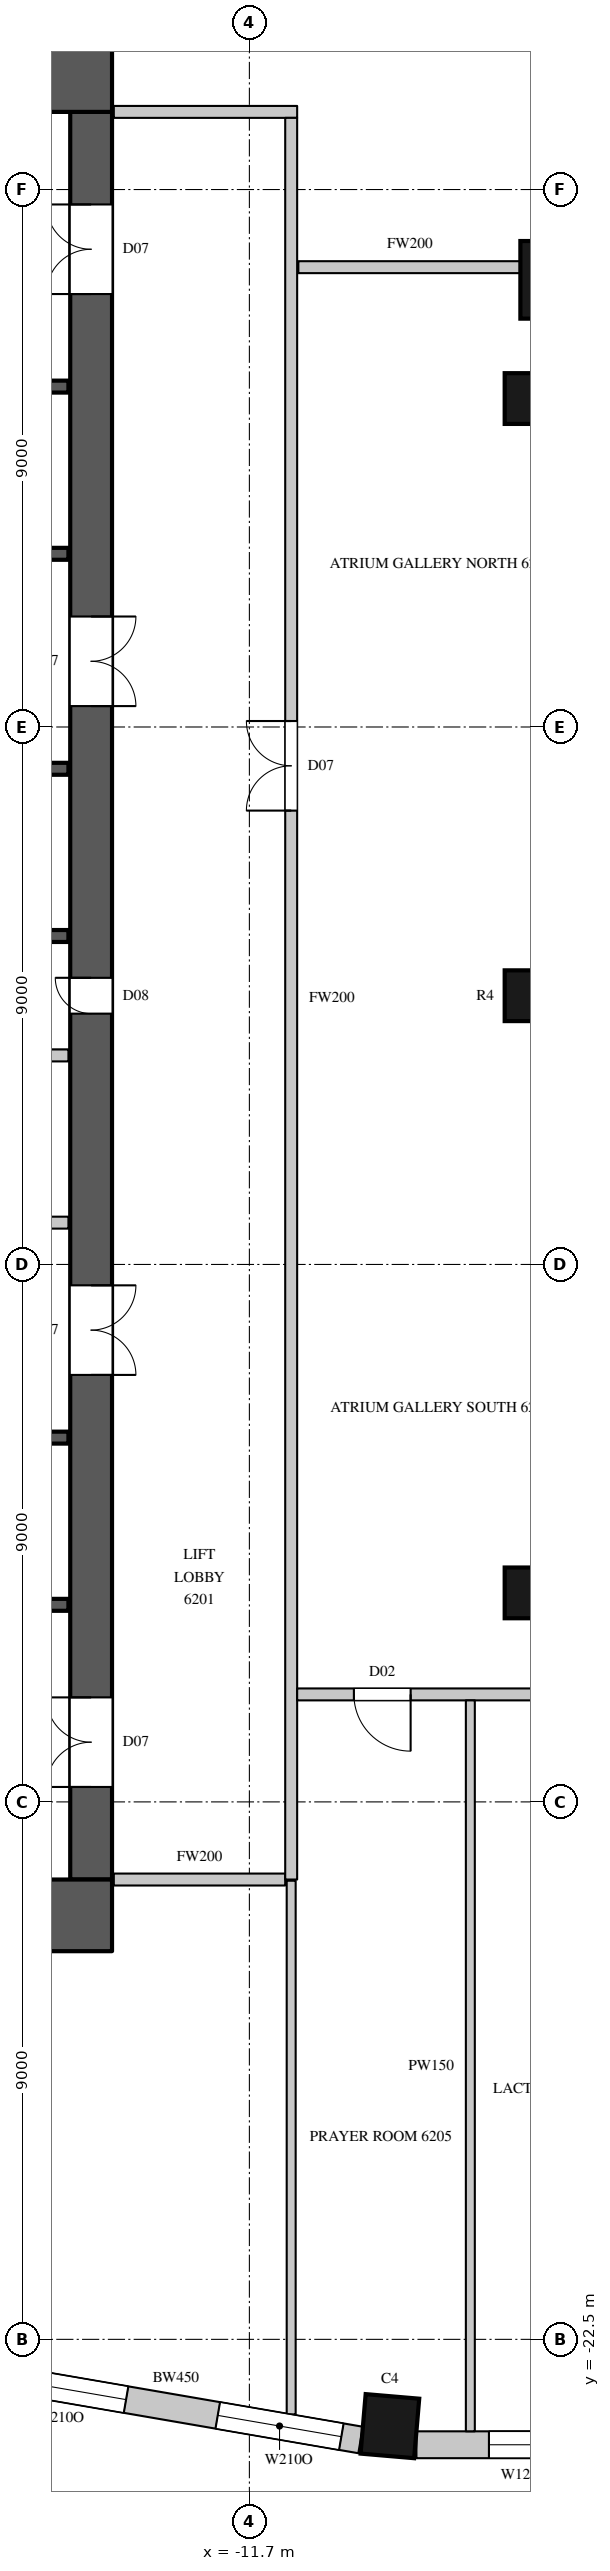
"""IFC4 building model, lengths in metres.
Left out: names, types, materials, properties, quantities, classifications, styles, units other than length and angle.
Written with IfcOpenShell. Run it as: python <this file> out.ifc"""

import sys

from ifc_helpers import new_model, si_unit, direction, frame, frame_2d, origin, origin_2d, place, context, subcontext, project, spatial, rectangle, circle, extrude, element, fill, save


model = new_model("IFC4")
c1 = context("Model", 3, precision=1e-05, world=origin(), true_north=direction((0.0, 1.0)))
c2 = subcontext(c1, "Body", "Model", "MODEL_VIEW")
j1 = project(units=[si_unit("LENGTHUNIT", "METRE"), si_unit("PLANEANGLEUNIT", "RADIAN")], contexts=[c1])
p1 = place(None, origin())
s1 = spatial("IfcSite", under=j1, at=p1, CompositionType="ELEMENT")
p2 = place(p1, origin())
s2 = spatial("IfcBuilding", under=s1, at=p2, CompositionType="ELEMENT")
p3 = place(p2, frame((0.0, 0.0, 276.2)))
s3 = spatial("IfcBuildingStorey", under=s2, at=p3, CompositionType="ELEMENT", Elevation=276.2)
p4 = place(p3, frame((-6.512, 11.988, 0.0), z_axis=(0.0, 0.0, 1.0), x_axis=(1.0, 0.0, 0.0)))
e1 = element("IfcColumn", 1, at=p4, inside=s3, PredefinedType="COLUMN", context=c2, shape_type="SweptSolid", body=[
    extrude(circle(Radius=0.65, at=origin_2d()), origin(), (0.0, 0.0, 1.0), 4.1),
])
p5 = place(p3, frame((-9.347, -23.954, 0.0), z_axis=(0.0, 0.0, 1.0), x_axis=(0.996368206733, -0.085149260784, 0.0)))
e2 = element("IfcColumn", 2, at=p5, inside=s3, PredefinedType="COLUMN", context=c2, shape_type="SweptSolid", body=[
    extrude(rectangle(XDim=0.9, YDim=1.0, at=origin_2d()), origin(), (0.0, 0.0, 1.0), 4.1),
])
for number, where, z_axis, x_axis in (
    (3, (-7.0, -10.0, 0.0), (0.0, 0.0, 1.0), (1.0, 0.0, 0.0)),
    (4, (-7.0, 0.0, 0.0), (0.0, 0.0, 1.0), (1.0, 0.0, 0.0)),
    (5, (-7.0, 10.0, 0.0), (0.0, 0.0, 1.0), (1.0, 0.0, 0.0)),
):
    element("IfcColumn", number, at=place(p3, frame(where, z_axis=z_axis, x_axis=x_axis)), inside=s3, PredefinedType="COLUMN", context=c2, shape_type="SweptSolid", body=[
        extrude(circle(Radius=0.425, at=origin_2d()), origin(), (0.0, 0.0, 1.0), 4.1),
    ])
p6 = place(p3, frame((-16.157, -23.097, 0.0), z_axis=(0.0, 0.0, 1.0), x_axis=(0.985502073964, -0.169663379113, 0.0)))
e6 = element("IfcWall", 6, at=p6, inside=s3, PredefinedType="SOLIDWALL", context=c2, shape_type="SweptSolid", body=[
    extrude(rectangle(XDim=6.412, YDim=0.45, at=frame_2d((3.206, 0.0))), origin(), (0.0, 0.0, 1.0), 3.8),
])
p7 = place(p6, frame((0.327, 0.0, 1.05)))
e7 = element("IfcOpeningElement", 7, at=p7, cuts=e6, PredefinedType="OPENING", context=c2, shape_type="SweptSolid", body=[
    extrude(rectangle(XDim=2.1, YDim=2.4, at=frame_2d((1.05, 1.2))), frame((0.0, 0.235, 0.0), z_axis=(0.0, -1.0, 0.0), x_axis=(1.0, 0.0, 0.0)), (0.0, 0.0, 1.0), 0.47),
])
p8 = place(p6, frame((3.985, 0.0, 1.05)))
e8 = element("IfcOpeningElement", 8, at=p8, cuts=e6, PredefinedType="OPENING", context=c2, shape_type="SweptSolid", body=[
    extrude(rectangle(XDim=2.1, YDim=2.4, at=frame_2d((1.05, 1.2))), frame((0.0, 0.235, 0.0), z_axis=(0.0, -1.0, 0.0), x_axis=(1.0, 0.0, 0.0)), (0.0, 0.0, 1.0), 0.47),
])
p9 = place(p3, frame((-8.903, -24.265, 0.0), z_axis=(0.0, 0.0, 1.0), x_axis=(1.0, 0.0, 0.0)))
e9 = element("IfcWall", 9, at=p9, inside=s3, PredefinedType="SOLIDWALL", context=c2, shape_type="SweptSolid", body=[
    extrude(rectangle(XDim=6.406, YDim=0.45, at=frame_2d((3.203, 0.0))), origin(), (0.0, 0.0, 1.0), 3.8),
])
p10 = place(p9, frame((3.98, 0.0, 1.05)))
e10 = element("IfcOpeningElement", 10, at=p10, cuts=e9, PredefinedType="OPENING", context=c2, shape_type="SweptSolid", body=[
    extrude(rectangle(XDim=2.1, YDim=2.4, at=frame_2d((1.05, 1.2))), frame((0.0, 0.235, 0.0), z_axis=(0.0, -1.0, 0.0), x_axis=(1.0, 0.0, 0.0)), (0.0, 0.0, 1.0), 0.47),
])
p11 = place(p9, frame((1.214, 0.0, 1.05)))
e11 = element("IfcOpeningElement", 11, at=p11, cuts=e9, PredefinedType="OPENING", context=c2, shape_type="SweptSolid", body=[
    extrude(rectangle(XDim=1.2, YDim=2.4, at=frame_2d((0.6, 1.2))), frame((0.0, 0.235, 0.0), z_axis=(0.0, -1.0, 0.0), x_axis=(1.0, 0.0, 0.0)), (0.0, 0.0, 1.0), 0.47),
])
for number, where, z_axis, x_axis in (
    (12, (-30.0, 15.4, 0.0), (0.0, 0.0, 1.0), (1.0, 0.0, 0.0)),
    (13, (-30.0, -15.4, 0.0), (0.0, 0.0, 1.0), (1.0, 0.0, 0.0)),
):
    element("IfcWall", number, at=place(p3, frame(where, z_axis=z_axis, x_axis=x_axis)), inside=s3, PredefinedType="SHEAR", context=c2, shape_type="SweptSolid", body=[
        extrude(rectangle(XDim=16.0, YDim=1.2, at=frame_2d((8.0, 0.0))), origin(), (0.0, 0.0, 1.0), 4.1),
    ])
p12 = place(p3, frame((-14.35, -14.8, 0.0), z_axis=(0.0, 0.0, 1.0), x_axis=(0.0, 1.0, 0.0)))
e14 = element("IfcWall", 14, at=p12, inside=s3, PredefinedType="SHEAR", context=c2, shape_type="SweptSolid", body=[
    extrude(rectangle(XDim=29.6, YDim=0.7, at=frame_2d((14.8, 0.0))), origin(), (0.0, 0.0, 1.0), 4.1),
])
p13 = place(p12, frame((1.55, 0.0, 0.0)))
e15 = element("IfcOpeningElement", 15, at=p13, cuts=e14, PredefinedType="OPENING", context=c2, shape_type="SweptSolid", body=[
    extrude(rectangle(XDim=1.5, YDim=2.4, at=frame_2d((0.75, 1.2))), frame((0.0, 0.36, 0.0), z_axis=(0.0, -1.0, 0.0), x_axis=(1.0, 0.0, 0.0)), (0.0, 0.0, 1.0), 0.72),
])
p14 = place(p12, frame((26.55, 0.0, 0.0)))
e16 = element("IfcOpeningElement", 16, at=p14, cuts=e14, PredefinedType="OPENING", context=c2, shape_type="SweptSolid", body=[
    extrude(rectangle(XDim=1.5, YDim=2.4, at=frame_2d((0.75, 1.2))), frame((0.0, 0.36, 0.0), z_axis=(0.0, -1.0, 0.0), x_axis=(1.0, 0.0, 0.0)), (0.0, 0.0, 1.0), 0.72),
])
p15 = place(p12, frame((8.45, 0.0, 0.0)))
e17 = element("IfcOpeningElement", 17, at=p15, cuts=e14, PredefinedType="OPENING", context=c2, shape_type="SweptSolid", body=[
    extrude(rectangle(XDim=1.5, YDim=2.4, at=frame_2d((0.75, 1.2))), frame((0.0, 0.36, 0.0), z_axis=(0.0, -1.0, 0.0), x_axis=(1.0, 0.0, 0.0)), (0.0, 0.0, 1.0), 0.72),
])
p16 = place(p12, frame((19.65, 0.0, 0.0)))
e18 = element("IfcOpeningElement", 18, at=p16, cuts=e14, PredefinedType="OPENING", context=c2, shape_type="SweptSolid", body=[
    extrude(rectangle(XDim=1.5, YDim=2.4, at=frame_2d((0.75, 1.2))), frame((0.0, 0.36, 0.0), z_axis=(0.0, -1.0, 0.0), x_axis=(1.0, 0.0, 0.0)), (0.0, 0.0, 1.0), 0.72),
])
p17 = place(p12, frame((14.5, 0.0, 0.0)))
e19 = element("IfcOpeningElement", 19, at=p17, cuts=e14, PredefinedType="OPENING", context=c2, shape_type="SweptSolid", body=[
    extrude(rectangle(XDim=0.6, YDim=2.0, at=frame_2d((0.3, 1.0))), frame((0.0, 0.36, 0.0), z_axis=(0.0, -1.0, 0.0), x_axis=(1.0, 0.0, 0.0)), (0.0, 0.0, 1.0), 0.72),
])
p18 = place(p3, frame((-29.27, -3.8, 0.0), z_axis=(0.0, 0.0, 1.0), x_axis=(1.0, 0.0, 0.0)))
e20 = element("IfcWall", 20, at=p18, inside=s3, PredefinedType="PARTITIONING", context=c2, shape_type="SweptSolid", body=[
    extrude(rectangle(XDim=14.54, YDim=0.2, at=frame_2d((7.27, 0.0))), origin(), (0.0, 0.0, 1.0), 3.8),
])
p19 = place(p18, frame((0.8, 0.0, 0.0)))
e21 = element("IfcOpeningElement", 21, at=p19, cuts=e20, PredefinedType="OPENING", context=c2, shape_type="SweptSolid", body=[
    extrude(rectangle(XDim=0.9, YDim=2.2, at=frame_2d((0.45, 1.1))), frame((0.0, 0.11, 0.0), z_axis=(0.0, -1.0, 0.0), x_axis=(1.0, 0.0, 0.0)), (0.0, 0.0, 1.0), 0.22),
])
p20 = place(p18, frame((3.8, 0.0, 0.0)))
e22 = element("IfcOpeningElement", 22, at=p20, cuts=e20, PredefinedType="OPENING", context=c2, shape_type="SweptSolid", body=[
    extrude(rectangle(XDim=0.9, YDim=2.2, at=frame_2d((0.45, 1.1))), frame((0.0, 0.11, 0.0), z_axis=(0.0, -1.0, 0.0), x_axis=(1.0, 0.0, 0.0)), (0.0, 0.0, 1.0), 0.22),
])
p21 = place(p18, frame((8.25, 0.0, 0.0)))
e23 = element("IfcOpeningElement", 23, at=p21, cuts=e20, PredefinedType="OPENING", context=c2, shape_type="SweptSolid", body=[
    extrude(rectangle(XDim=0.9, YDim=2.2, at=frame_2d((0.45, 1.1))), frame((0.0, 0.11, 0.0), z_axis=(0.0, -1.0, 0.0), x_axis=(1.0, 0.0, 0.0)), (0.0, 0.0, 1.0), 0.22),
])
p22 = place(p18, frame((12.35, 0.0, 0.0)))
e24 = element("IfcOpeningElement", 24, at=p22, cuts=e20, PredefinedType="OPENING", context=c2, shape_type="SweptSolid", body=[
    extrude(rectangle(XDim=0.9, YDim=2.2, at=frame_2d((0.45, 1.1))), frame((0.0, 0.11, 0.0), z_axis=(0.0, -1.0, 0.0), x_axis=(1.0, 0.0, 0.0)), (0.0, 0.0, 1.0), 0.22),
])
p23 = place(p3, frame((-13.97, -14.8, 0.0), z_axis=(0.0, 0.0, 1.0), x_axis=(1.0, 0.0, 0.0)))
e25 = element("IfcWall", 25, at=p23, inside=s3, PredefinedType="PARTITIONING", context=c2, shape_type="SweptSolid", body=[
    extrude(rectangle(XDim=2.87, YDim=0.2, at=frame_2d((1.435, 0.0))), origin(), (0.0, 0.0, 1.0), 3.8),
])
p24 = place(p3, frame((-13.97, 14.8, 0.0), z_axis=(0.0, 0.0, 1.0), x_axis=(1.0, 0.0, 0.0)))
e26 = element("IfcWall", 26, at=p24, inside=s3, PredefinedType="PARTITIONING", context=c2, shape_type="SweptSolid", body=[
    extrude(rectangle(XDim=3.07, YDim=0.2, at=frame_2d((1.535, 0.0))), origin(), (0.0, 0.0, 1.0), 3.8),
])
p25 = place(p3, frame((-11.0, -14.8, 0.0), z_axis=(0.0, 0.0, 1.0), x_axis=(0.0, 1.0, 0.0)))
e27 = element("IfcWall", 27, at=p25, inside=s3, PredefinedType="PARTITIONING", context=c2, shape_type="SweptSolid", body=[
    extrude(rectangle(XDim=29.5, YDim=0.2, at=frame_2d((14.75, 0.0))), origin(), (0.0, 0.0, 1.0), 3.8),
])
p26 = place(p25, frame((17.9, 0.0, 0.0)))
e28 = element("IfcOpeningElement", 28, at=p26, cuts=e27, PredefinedType="OPENING", context=c2, shape_type="SweptSolid", body=[
    extrude(rectangle(XDim=1.5, YDim=2.4, at=frame_2d((0.75, 1.2))), frame((0.0, 0.11, 0.0), z_axis=(0.0, -1.0, 0.0), x_axis=(1.0, 0.0, 0.0)), (0.0, 0.0, 1.0), 0.22),
])
p27 = place(p3, frame((-10.9, -11.7, 0.0), z_axis=(0.0, 0.0, 1.0), x_axis=(1.0, 0.0, 0.0)))
e29 = element("IfcWall", 29, at=p27, inside=s3, PredefinedType="PARTITIONING", context=c2, shape_type="SweptSolid", body=[
    extrude(rectangle(XDim=21.5, YDim=0.2, at=frame_2d((10.75, 0.0))), origin(), (0.0, 0.0, 1.0), 3.8),
])
p28 = place(p27, frame((0.95, 0.0, 0.0)))
e30 = element("IfcOpeningElement", 30, at=p28, cuts=e29, PredefinedType="OPENING", context=c2, shape_type="SweptSolid", body=[
    extrude(rectangle(XDim=0.95, YDim=2.2, at=frame_2d((0.475, 1.1))), frame((0.0, 0.11, 0.0), z_axis=(0.0, -1.0, 0.0), x_axis=(1.0, 0.0, 0.0)), (0.0, 0.0, 1.0), 0.22),
])
p29 = place(p27, frame((4.2, 0.0, 0.0)))
e31 = element("IfcOpeningElement", 31, at=p29, cuts=e29, PredefinedType="OPENING", context=c2, shape_type="SweptSolid", body=[
    extrude(rectangle(XDim=0.9, YDim=2.2, at=frame_2d((0.45, 1.1))), frame((0.0, 0.11, 0.0), z_axis=(0.0, -1.0, 0.0), x_axis=(1.0, 0.0, 0.0)), (0.0, 0.0, 1.0), 0.22),
])
p30 = place(p27, frame((6.85, 0.0, 0.0)))
e32 = element("IfcOpeningElement", 32, at=p30, cuts=e29, PredefinedType="OPENING", context=c2, shape_type="SweptSolid", body=[
    extrude(rectangle(XDim=1.1, YDim=2.4, at=frame_2d((0.55, 1.2))), frame((0.0, 0.11, 0.0), z_axis=(0.0, -1.0, 0.0), x_axis=(1.0, 0.0, 0.0)), (0.0, 0.0, 1.0), 0.22),
])
p31 = place(p27, frame((9.95, 0.0, 0.0)))
e33 = element("IfcOpeningElement", 33, at=p31, cuts=e29, PredefinedType="OPENING", context=c2, shape_type="SweptSolid", body=[
    extrude(rectangle(XDim=1.1, YDim=2.4, at=frame_2d((0.55, 1.2))), frame((0.0, 0.11, 0.0), z_axis=(0.0, -1.0, 0.0), x_axis=(1.0, 0.0, 0.0)), (0.0, 0.0, 1.0), 0.22),
])
p32 = place(p3, frame((-10.88, 12.2, 0.0), z_axis=(0.0, 0.0, 1.0), x_axis=(1.0, 0.0, 0.0)))
e34 = element("IfcWall", 34, at=p32, inside=s3, PredefinedType="PARTITIONING", context=c2, shape_type="SweptSolid", body=[
    extrude(rectangle(XDim=3.736, YDim=0.2, at=frame_2d((1.868, 0.0))), origin(), (0.0, 0.0, 1.0), 3.8),
])
p33 = place(p3, frame((-11.0, -23.757, 0.0), z_axis=(0.0, 0.0, 1.0), x_axis=(0.0, 1.0, 0.0)))
e35 = element("IfcWall", 35, at=p33, inside=s3, PredefinedType="PARTITIONING", context=c2, shape_type="SweptSolid", body=[
    extrude(rectangle(XDim=8.937, YDim=0.15, at=frame_2d((4.468, 0.0))), origin(), (0.0, 0.0, 1.0), 3.8),
])
p34 = place(p3, frame((-8.0, -24.04, 0.0), z_axis=(0.0, 0.0, 1.0), x_axis=(0.0, 1.0, 0.0)))
e36 = element("IfcWall", 36, at=p34, inside=s3, PredefinedType="PARTITIONING", context=c2, shape_type="SweptSolid", body=[
    extrude(rectangle(XDim=12.24, YDim=0.15, at=frame_2d((6.12, 0.0))), origin(), (0.0, 0.0, 1.0), 3.8),
])
p35 = place(p3, frame((-29.27, -1.0, 0.0), z_axis=(0.0, 0.0, 1.0), x_axis=(1.0, 0.0, 0.0)))
e37 = element("IfcWall", 37, at=p35, inside=s3, PredefinedType="PARTITIONING", context=c2, shape_type="SweptSolid", body=[
    extrude(rectangle(XDim=14.54, YDim=0.2, at=frame_2d((7.27, 0.0))), origin(), (0.0, 0.0, 1.0), 3.8),
])
p36 = place(p3, frame((-17.92, -10.2, 0.0), z_axis=(0.0, 0.0, 1.0), x_axis=(1.0, 0.0, 0.0)))
e38 = element("IfcWall", 38, at=p36, inside=s3, PredefinedType="SHEAR", context=c2, shape_type="SweptSolid", body=[
    extrude(rectangle(XDim=3.19, YDim=0.2, at=frame_2d((1.595, 0.0))), origin(), (0.0, 0.0, 1.0), 3.8),
])
p37 = place(p36, frame((1.05, 0.0, 0.0)))
e39 = element("IfcOpeningElement", 39, at=p37, cuts=e38, PredefinedType="OPENING", context=c2, shape_type="SweptSolid", body=[
    extrude(rectangle(XDim=1.1, YDim=2.2, at=frame_2d((0.55, 1.1))), frame((0.0, 0.11, 0.0), z_axis=(0.0, -1.0, 0.0), x_axis=(1.0, 0.0, 0.0)), (0.0, 0.0, 1.0), 0.22),
])
for number, where, z_axis, x_axis in (
    (40, (-17.9, -7.4, 0.0), (0.0, 0.0, 1.0), (1.0, 0.0, 0.0)),
    (41, (-17.9, 1.0, 0.0), (0.0, 0.0, 1.0), (1.0, 0.0, 0.0)),
):
    element("IfcWall", number, at=place(p3, frame(where, z_axis=z_axis, x_axis=x_axis)), inside=s3, PredefinedType="SHEAR", context=c2, shape_type="SweptSolid", body=[
        extrude(rectangle(XDim=3.17, YDim=0.2, at=frame_2d((1.585, 0.0))), origin(), (0.0, 0.0, 1.0), 3.8),
    ])
p38 = place(p3, frame((-17.9, 3.8, 0.0), z_axis=(0.0, 0.0, 1.0), x_axis=(1.0, 0.0, 0.0)))
e42 = element("IfcWall", 42, at=p38, inside=s3, PredefinedType="SHEAR", context=c2, shape_type="SweptSolid", body=[
    extrude(rectangle(XDim=3.17, YDim=0.2, at=frame_2d((1.585, 0.0))), origin(), (0.0, 0.0, 1.0), 3.8),
])
p39 = place(p38, frame((1.05, 0.0, 0.0)))
e43 = element("IfcOpeningElement", 43, at=p39, cuts=e42, PredefinedType="OPENING", context=c2, shape_type="SweptSolid", body=[
    extrude(rectangle(XDim=1.1, YDim=2.2, at=frame_2d((0.55, 1.1))), frame((0.0, 0.11, 0.0), z_axis=(0.0, -1.0, 0.0), x_axis=(1.0, 0.0, 0.0)), (0.0, 0.0, 1.0), 0.22),
])
p40 = place(p3, frame((-17.92, 7.4, 0.0), z_axis=(0.0, 0.0, 1.0), x_axis=(1.0, 0.0, 0.0)))
e44 = element("IfcWall", 44, at=p40, inside=s3, PredefinedType="SHEAR", context=c2, shape_type="SweptSolid", body=[
    extrude(rectangle(XDim=3.19, YDim=0.2, at=frame_2d((1.595, 0.0))), origin(), (0.0, 0.0, 1.0), 3.8),
])
p41 = place(p3, frame((-17.92, 10.2, 0.0), z_axis=(0.0, 0.0, 1.0), x_axis=(1.0, 0.0, 0.0)))
e45 = element("IfcWall", 45, at=p41, inside=s3, PredefinedType="SHEAR", context=c2, shape_type="SweptSolid", body=[
    extrude(rectangle(XDim=3.19, YDim=0.2, at=frame_2d((1.595, 0.0))), origin(), (0.0, 0.0, 1.0), 3.8),
])
p42 = place(p41, frame((1.05, 0.0, 0.0)))
e46 = element("IfcOpeningElement", 46, at=p42, cuts=e45, PredefinedType="OPENING", context=c2, shape_type="SweptSolid", body=[
    extrude(rectangle(XDim=1.1, YDim=2.2, at=frame_2d((0.55, 1.1))), frame((0.0, 0.11, 0.0), z_axis=(0.0, -1.0, 0.0), x_axis=(1.0, 0.0, 0.0)), (0.0, 0.0, 1.0), 0.22),
])
p43 = place(p7, origin())
e47 = element("IfcWindow", 47, at=p43, inside=s3, PartitioningType="SINGLE_PANEL", PredefinedType="WINDOW", context=c2, shape_type="SweptSolid", body=[
    extrude(rectangle(XDim=2.1, YDim=2.4, at=frame_2d((1.05, 1.2))), frame((0.0, 0.135, 0.0), z_axis=(0.0, -1.0, 0.0), x_axis=(1.0, 0.0, 0.0)), (0.0, 0.0, 1.0), 0.06),
])
fill(e7, e47)
p44 = place(p8, origin())
e48 = element("IfcWindow", 48, at=p44, inside=s3, PartitioningType="SINGLE_PANEL", PredefinedType="WINDOW", context=c2, shape_type="SweptSolid", body=[
    extrude(rectangle(XDim=2.1, YDim=2.4, at=frame_2d((1.05, 1.2))), frame((0.0, 0.135, 0.0), z_axis=(0.0, -1.0, 0.0), x_axis=(1.0, 0.0, 0.0)), (0.0, 0.0, 1.0), 0.06),
])
fill(e8, e48)
p45 = place(p26, origin())
e49 = element("IfcDoor", 49, at=p45, inside=s3, OperationType="DOUBLE_DOOR_SINGLE_SWING", PredefinedType="DOOR", context=c2, shape_type="SweptSolid", body=[
    extrude(rectangle(XDim=1.5, YDim=2.4, at=frame_2d((0.75, 1.2))), frame((0.0, 0.025, 0.0), z_axis=(0.0, -1.0, 0.0), x_axis=(1.0, 0.0, 0.0)), (0.0, 0.0, 1.0), 0.05),
])
fill(e28, e49)
p46 = place(p28, origin())
e50 = element("IfcDoor", 50, at=p46, inside=s3, OperationType="SINGLE_SWING_LEFT", PredefinedType="DOOR", context=c2, shape_type="SweptSolid", body=[
    extrude(rectangle(XDim=0.95, YDim=2.2, at=frame_2d((0.475, 1.1))), frame((0.0, 0.025, 0.0), z_axis=(0.0, -1.0, 0.0), x_axis=(1.0, 0.0, 0.0)), (0.0, 0.0, 1.0), 0.05),
])
fill(e30, e50)
p47 = place(p13, origin())
e51 = element("IfcDoor", 51, at=p47, inside=s3, OperationType="DOUBLE_DOOR_SINGLE_SWING", PredefinedType="DOOR", context=c2, shape_type="SweptSolid", body=[
    extrude(rectangle(XDim=1.5, YDim=2.4, at=frame_2d((0.75, 1.2))), frame((0.0, 0.345, 0.0), z_axis=(0.0, -1.0, 0.0), x_axis=(1.0, 0.0, 0.0)), (0.0, 0.0, 1.0), 0.05),
])
fill(e15, e51)
p48 = place(p14, origin())
e52 = element("IfcDoor", 52, at=p48, inside=s3, OperationType="DOUBLE_DOOR_SINGLE_SWING", PredefinedType="DOOR", context=c2, shape_type="SweptSolid", body=[
    extrude(rectangle(XDim=1.5, YDim=2.4, at=frame_2d((0.75, 1.2))), frame((0.0, 0.345, 0.0), z_axis=(0.0, -1.0, 0.0), x_axis=(1.0, 0.0, 0.0)), (0.0, 0.0, 1.0), 0.05),
])
fill(e16, e52)
p49 = place(p15, origin())
e53 = element("IfcDoor", 53, at=p49, inside=s3, OperationType="DOUBLE_DOOR_SINGLE_SWING", PredefinedType="DOOR", context=c2, shape_type="SweptSolid", body=[
    extrude(rectangle(XDim=1.5, YDim=2.4, at=frame_2d((0.75, 1.2))), frame((0.0, -0.295, 0.0), z_axis=(0.0, -1.0, 0.0), x_axis=(1.0, 0.0, 0.0)), (0.0, 0.0, 1.0), 0.05),
])
fill(e17, e53)
p50 = place(p16, origin())
e54 = element("IfcDoor", 54, at=p50, inside=s3, OperationType="DOUBLE_DOOR_SINGLE_SWING", PredefinedType="DOOR", context=c2, shape_type="SweptSolid", body=[
    extrude(rectangle(XDim=1.5, YDim=2.4, at=frame_2d((0.75, 1.2))), frame((0.0, -0.295, 0.0), z_axis=(0.0, -1.0, 0.0), x_axis=(1.0, 0.0, 0.0)), (0.0, 0.0, 1.0), 0.05),
])
fill(e18, e54)
p51 = place(p17, origin())
e55 = element("IfcDoor", 55, at=p51, inside=s3, OperationType="SINGLE_SWING_RIGHT", PredefinedType="DOOR", context=c2, shape_type="SweptSolid", body=[
    extrude(rectangle(XDim=0.6, YDim=2.0, at=frame_2d((0.3, 1.0))), frame((0.0, 0.345, 0.0), z_axis=(0.0, -1.0, 0.0), x_axis=(1.0, 0.0, 0.0)), (0.0, 0.0, 1.0), 0.05),
])
fill(e19, e55)
p52 = place(p11, origin())
e56 = element("IfcWindow", 56, at=p52, inside=s3, PartitioningType="SINGLE_PANEL", PredefinedType="WINDOW", context=c2, shape_type="SweptSolid", body=[
    extrude(rectangle(XDim=1.2, YDim=2.4, at=frame_2d((0.6, 1.2))), frame((0.0, 0.135, 0.0), z_axis=(0.0, -1.0, 0.0), x_axis=(1.0, 0.0, 0.0)), (0.0, 0.0, 1.0), 0.06),
])
fill(e11, e56)
save(model, sys.argv[1])
